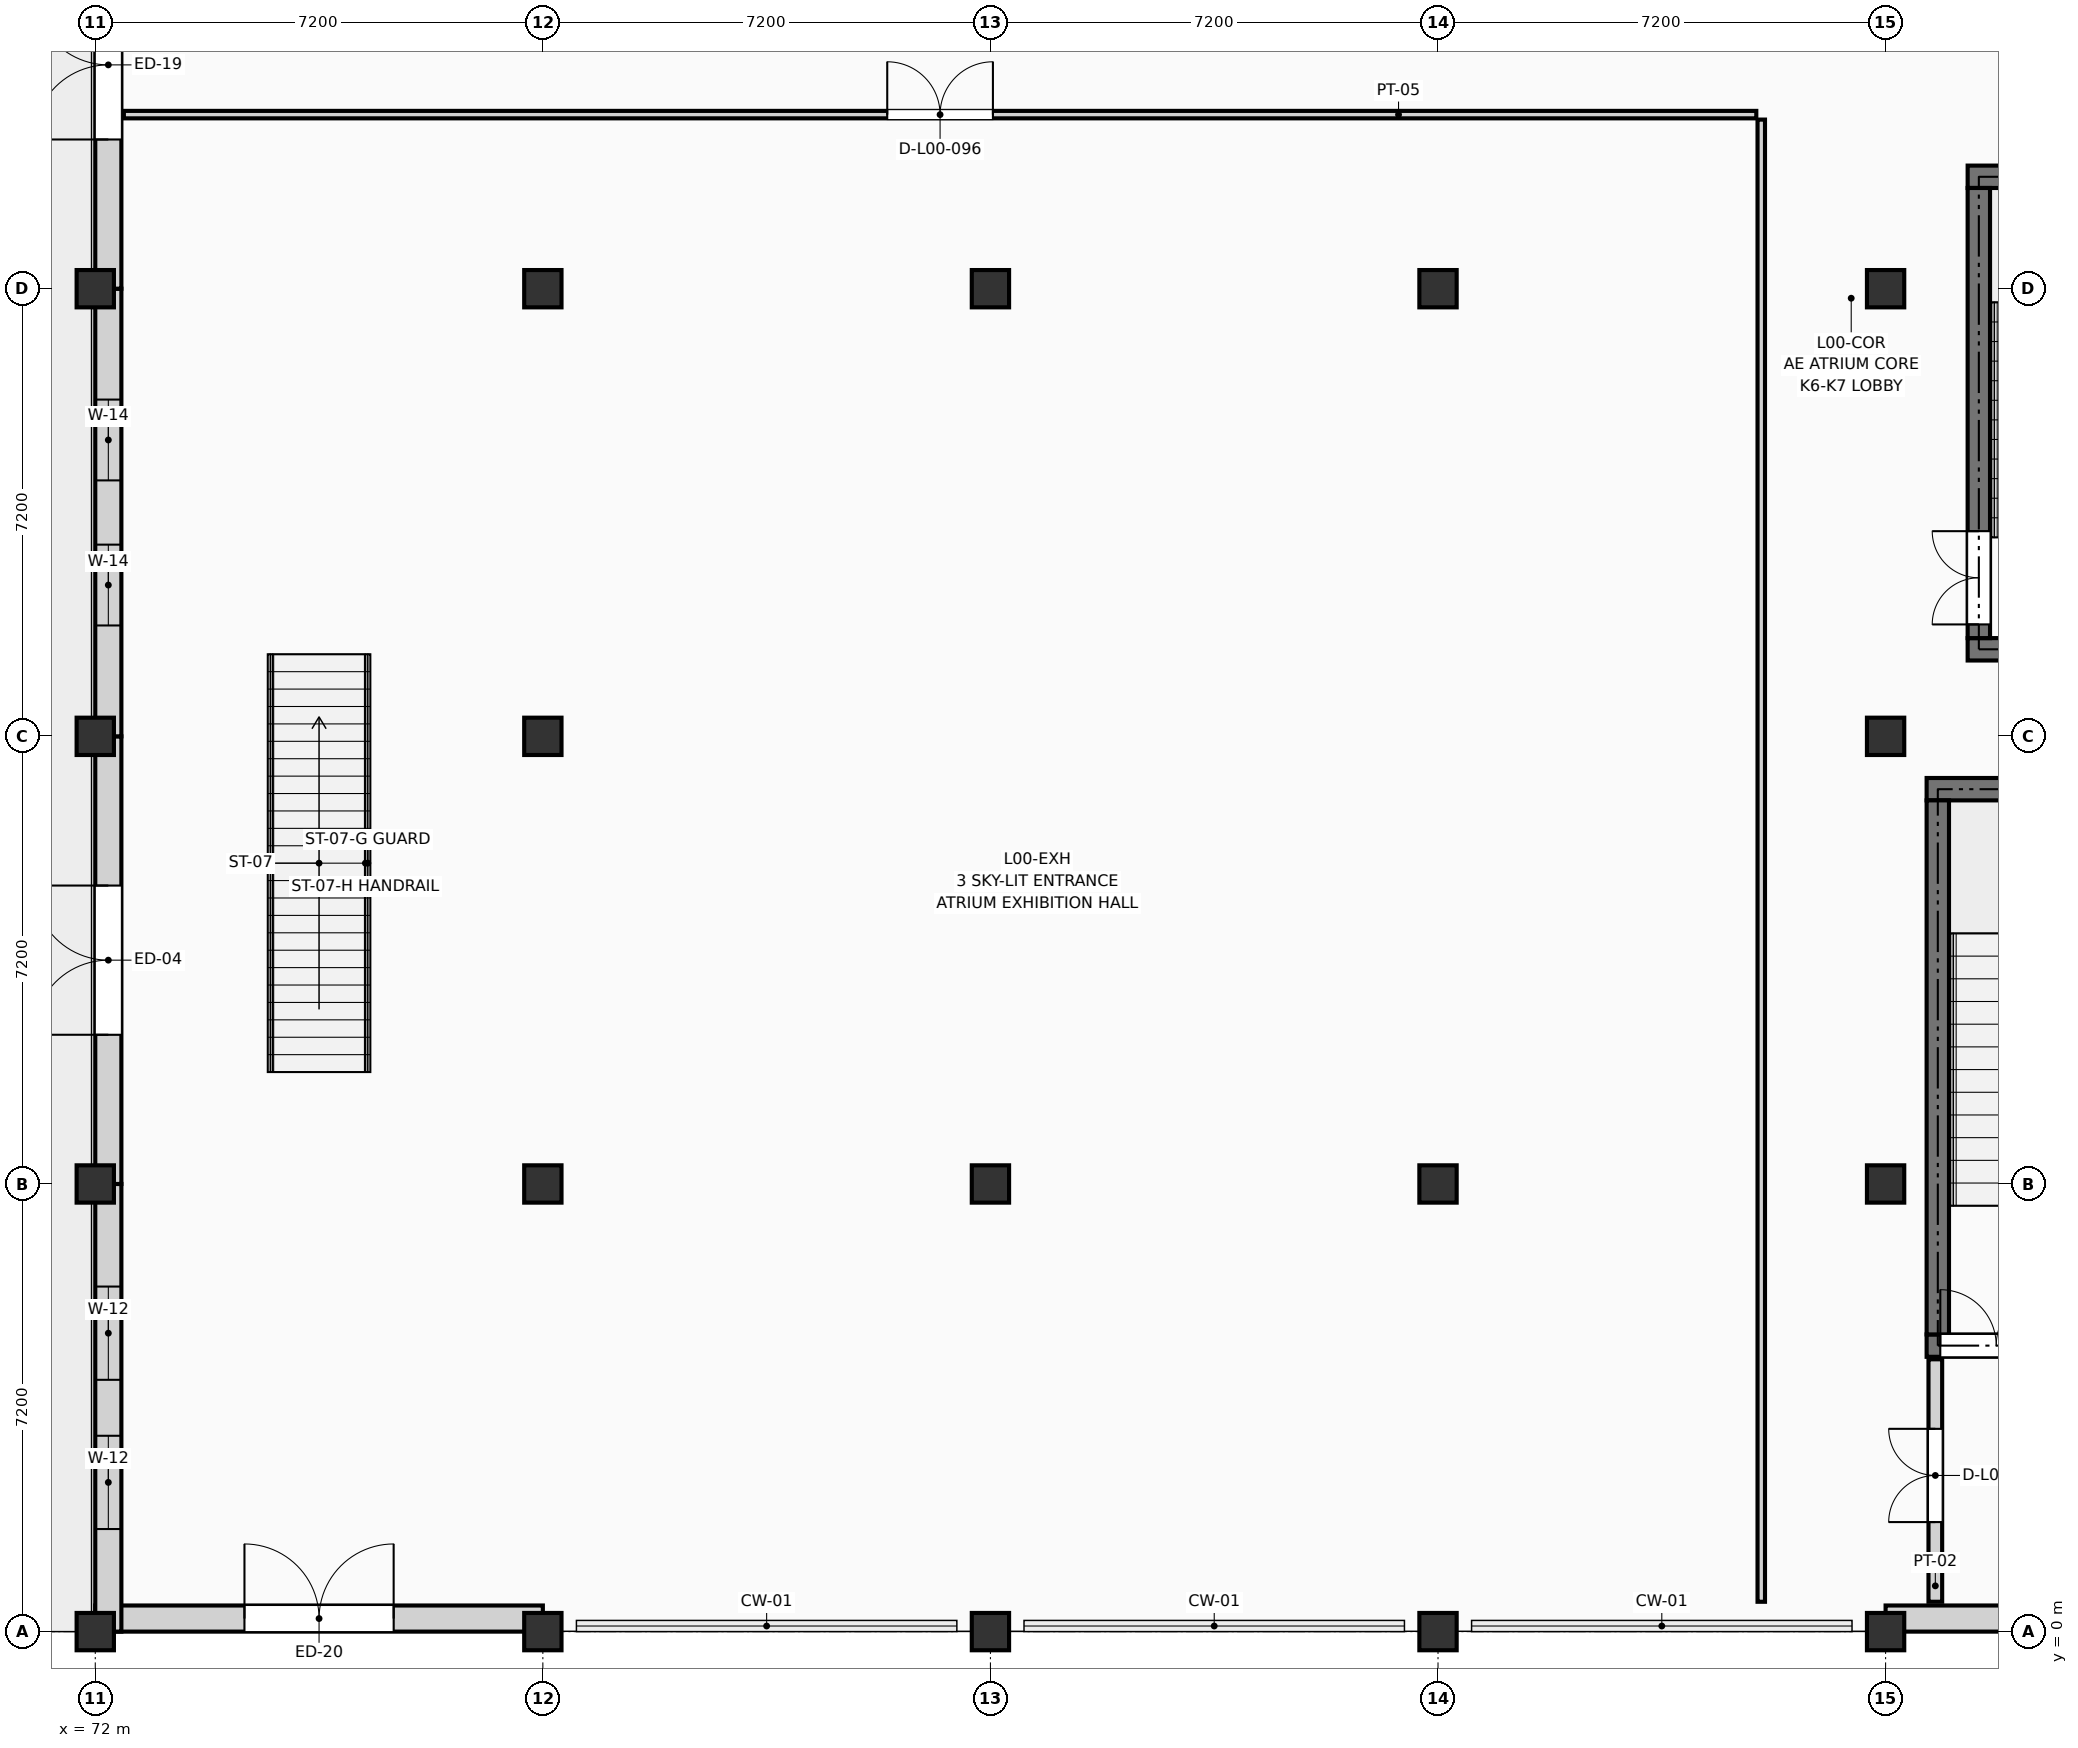
"""IFC4 building model, lengths in metres.
Left out: names, types, materials, properties, quantities, classifications, styles, units other than length and angle.
Written with IfcOpenShell. Run it as: python <this file> out.ifc"""

import sys

from ifc_helpers import new_model, si_unit, direction, frame, frame_2d, origin, origin_2d, place, context, subcontext, project, spatial, rectangle, extrude, element, fill, save


model = new_model("IFC4")
c1 = context("Model", 3, precision=1e-05, world=origin(), true_north=direction((0.0, 1.0)))
c2 = subcontext(c1, "Body", "Model", "MODEL_VIEW")
j1 = project(units=[si_unit("LENGTHUNIT", "METRE"), si_unit("PLANEANGLEUNIT", "RADIAN")], contexts=[c1])
p1 = place(None, origin())
s1 = spatial("IfcSite", under=j1, at=p1, CompositionType="ELEMENT")
p2 = place(p1, origin())
s2 = spatial("IfcBuilding", under=s1, at=p2, CompositionType="ELEMENT")
p3 = place(p2, origin())
s3 = spatial("IfcBuildingStorey", under=s2, at=p3, CompositionType="ELEMENT", Elevation=0.0)
for number, where, z_axis, x_axis in (
    (1, (72.0, 0.0, 0.0), (0.0, 0.0, 1.0), (1.0, 0.0, 0.0)),
    (2, (72.0, 7.2, 0.0), (0.0, 0.0, 1.0), (1.0, 0.0, 0.0)),
    (3, (72.0, 14.4, 0.0), (0.0, 0.0, 1.0), (1.0, 0.0, 0.0)),
    (4, (72.0, 21.6, 0.0), (0.0, 0.0, 1.0), (1.0, 0.0, 0.0)),
    (5, (79.2, 0.0, 0.0), (0.0, 0.0, 1.0), (1.0, 0.0, 0.0)),
    (6, (79.2, 7.2, 0.0), (0.0, 0.0, 1.0), (1.0, 0.0, 0.0)),
    (7, (79.2, 14.4, 0.0), (0.0, 0.0, 1.0), (1.0, 0.0, 0.0)),
    (8, (79.2, 21.6, 0.0), (0.0, 0.0, 1.0), (1.0, 0.0, 0.0)),
    (9, (86.4, 0.0, 0.0), (0.0, 0.0, 1.0), (1.0, 0.0, 0.0)),
    (10, (86.4, 7.2, 0.0), (0.0, 0.0, 1.0), (1.0, 0.0, 0.0)),
    (11, (86.4, 21.6, 0.0), (0.0, 0.0, 1.0), (1.0, 0.0, 0.0)),
    (12, (93.6, 0.0, 0.0), (0.0, 0.0, 1.0), (1.0, 0.0, 0.0)),
    (13, (93.6, 7.2, 0.0), (0.0, 0.0, 1.0), (1.0, 0.0, 0.0)),
    (14, (93.6, 21.6, 0.0), (0.0, 0.0, 1.0), (1.0, 0.0, 0.0)),
    (15, (100.8, 0.0, 0.0), (0.0, 0.0, 1.0), (1.0, 0.0, 0.0)),
    (16, (100.8, 7.2, 0.0), (0.0, 0.0, 1.0), (1.0, 0.0, 0.0)),
    (17, (100.8, 14.4, 0.0), (0.0, 0.0, 1.0), (1.0, 0.0, 0.0)),
    (18, (100.8, 21.6, 0.0), (0.0, 0.0, 1.0), (1.0, 0.0, 0.0)),
):
    element("IfcColumn", number, at=place(p3, frame(where, z_axis=z_axis, x_axis=x_axis)), inside=s3, PredefinedType="COLUMN", context=c2, shape_type="SweptSolid", body=[
        extrude(rectangle(XDim=0.6, YDim=0.6, at=origin_2d()), origin(), (0.0, 0.0, 1.0), 4.5),
    ])
p4 = place(p3, frame((100.8, 0.21, 0.0), z_axis=(0.0, 0.0, 1.0), x_axis=(1.0, 0.0, 0.0)))
e19 = element("IfcWall", 19, at=p4, inside=s3, PredefinedType="SOLIDWALL", context=c2, shape_type="SweptSolid", body=[
    extrude(rectangle(XDim=7.2, YDim=0.42, at=frame_2d((3.6, 0.0))), origin(), (0.0, 0.0, 1.0), 3.62),
])
p5 = place(p4, frame((2.4, 0.0, 0.0)))
e20 = element("IfcOpeningElement", 20, at=p5, cuts=e19, PredefinedType="OPENING", context=c2, shape_type="SweptSolid", body=[
    extrude(rectangle(XDim=2.4, YDim=2.6, at=frame_2d((1.2, 1.3))), frame((0.0, 0.222, 0.0), z_axis=(0.0, -1.0, 0.0), x_axis=(1.0, 0.0, 0.0)), (0.0, 0.0, 1.0), 0.444),
])
p6 = place(p3, frame((72.0, 0.21, 0.0), z_axis=(0.0, 0.0, 1.0), x_axis=(1.0, 0.0, 0.0)))
e21 = element("IfcWall", 21, at=p6, inside=s3, PredefinedType="SOLIDWALL", context=c2, shape_type="SweptSolid", body=[
    extrude(rectangle(XDim=7.2, YDim=0.42, at=frame_2d((3.6, 0.0))), origin(), (0.0, 0.0, 1.0), 3.62),
])
p7 = place(p6, frame((2.4, 0.0, 0.0)))
e22 = element("IfcOpeningElement", 22, at=p7, cuts=e21, PredefinedType="OPENING", context=c2, shape_type="SweptSolid", body=[
    extrude(rectangle(XDim=2.4, YDim=2.6, at=frame_2d((1.2, 1.3))), frame((0.0, 0.222, 0.0), z_axis=(0.0, -1.0, 0.0), x_axis=(1.0, 0.0, 0.0)), (0.0, 0.0, 1.0), 0.444),
])
p8 = place(p3, frame((72.21, 0.0, 0.0), z_axis=(0.0, 0.0, 1.0), x_axis=(0.0, 1.0, 0.0)))
e23 = element("IfcWall", 23, at=p8, inside=s3, PredefinedType="SOLIDWALL", context=c2, shape_type="SweptSolid", body=[
    extrude(rectangle(XDim=7.2, YDim=0.42, at=frame_2d((3.6, 0.0))), origin(), (0.0, 0.0, 1.0), 3.62),
])
p9 = place(p8, frame((1.65, 0.0, 0.45)))
e24 = element("IfcOpeningElement", 24, at=p9, cuts=e23, PredefinedType="OPENING", context=c2, shape_type="SweptSolid", body=[
    extrude(rectangle(XDim=1.5, YDim=2.6, at=frame_2d((0.75, 1.3))), frame((0.0, 0.222, 0.0), z_axis=(0.0, -1.0, 0.0), x_axis=(1.0, 0.0, 0.0)), (0.0, 0.0, 1.0), 0.444),
])
p10 = place(p8, frame((4.05, 0.0, 0.45)))
e25 = element("IfcOpeningElement", 25, at=p10, cuts=e23, PredefinedType="OPENING", context=c2, shape_type="SweptSolid", body=[
    extrude(rectangle(XDim=1.5, YDim=2.6, at=frame_2d((0.75, 1.3))), frame((0.0, 0.222, 0.0), z_axis=(0.0, -1.0, 0.0), x_axis=(1.0, 0.0, 0.0)), (0.0, 0.0, 1.0), 0.444),
])
p11 = place(p3, frame((72.21, 7.2, 0.0), z_axis=(0.0, 0.0, 1.0), x_axis=(0.0, 1.0, 0.0)))
e26 = element("IfcWall", 26, at=p11, inside=s3, PredefinedType="SOLIDWALL", context=c2, shape_type="SweptSolid", body=[
    extrude(rectangle(XDim=7.2, YDim=0.42, at=frame_2d((3.6, 0.0))), origin(), (0.0, 0.0, 1.0), 3.62),
])
p12 = place(p11, frame((2.4, 0.0, 0.0)))
e27 = element("IfcOpeningElement", 27, at=p12, cuts=e26, PredefinedType="OPENING", context=c2, shape_type="SweptSolid", body=[
    extrude(rectangle(XDim=2.4, YDim=2.6, at=frame_2d((1.2, 1.3))), frame((0.0, 0.222, 0.0), z_axis=(0.0, -1.0, 0.0), x_axis=(1.0, 0.0, 0.0)), (0.0, 0.0, 1.0), 0.444),
])
p13 = place(p3, frame((72.21, 14.4, 0.0), z_axis=(0.0, 0.0, 1.0), x_axis=(0.0, 1.0, 0.0)))
e28 = element("IfcWall", 28, at=p13, inside=s3, PredefinedType="SOLIDWALL", context=c2, shape_type="SweptSolid", body=[
    extrude(rectangle(XDim=7.2, YDim=0.42, at=frame_2d((3.6, 0.0))), origin(), (0.0, 0.0, 1.0), 3.62),
])
p14 = place(p13, frame((1.783, 0.0, 0.45)))
e29 = element("IfcOpeningElement", 29, at=p14, cuts=e28, PredefinedType="OPENING", context=c2, shape_type="SweptSolid", body=[
    extrude(rectangle(XDim=1.3, YDim=2.5, at=frame_2d((0.65, 1.25))), frame((0.0, 0.222, 0.0), z_axis=(0.0, -1.0, 0.0), x_axis=(1.0, 0.0, 0.0)), (0.0, 0.0, 1.0), 0.444),
])
p15 = place(p13, frame((4.117, 0.0, 0.45)))
e30 = element("IfcOpeningElement", 30, at=p15, cuts=e28, PredefinedType="OPENING", context=c2, shape_type="SweptSolid", body=[
    extrude(rectangle(XDim=1.3, YDim=2.5, at=frame_2d((0.65, 1.25))), frame((0.0, 0.222, 0.0), z_axis=(0.0, -1.0, 0.0), x_axis=(1.0, 0.0, 0.0)), (0.0, 0.0, 1.0), 0.444),
])
p16 = place(p3, frame((72.21, 21.6, 0.0), z_axis=(0.0, 0.0, 1.0), x_axis=(0.0, 1.0, 0.0)))
e31 = element("IfcWall", 31, at=p16, inside=s3, PredefinedType="SOLIDWALL", context=c2, shape_type="SweptSolid", body=[
    extrude(rectangle(XDim=7.2, YDim=0.42, at=frame_2d((3.6, 0.0))), origin(), (0.0, 0.0, 1.0), 3.62),
])
p17 = place(p16, frame((2.4, 0.0, 0.0)))
e32 = element("IfcOpeningElement", 32, at=p17, cuts=e31, PredefinedType="OPENING", context=c2, shape_type="SweptSolid", body=[
    extrude(rectangle(XDim=2.4, YDim=2.6, at=frame_2d((1.2, 1.3))), frame((0.0, 0.222, 0.0), z_axis=(0.0, -1.0, 0.0), x_axis=(1.0, 0.0, 0.0)), (0.0, 0.0, 1.0), 0.444),
])
for number, where, z_axis, x_axis in (
    (33, (102.12, 15.8, 0.0), (0.0, 0.0, 1.0), (1.0, 0.0, 0.0)),
    (34, (102.12, 23.4, 0.0), (0.0, 0.0, 1.0), (1.0, 0.0, 0.0)),
):
    element("IfcWall", number, at=place(p3, frame(where, z_axis=z_axis, x_axis=x_axis)), inside=s3, PredefinedType="SHEAR", context=c2, shape_type="SweptSolid", body=[
        extrude(rectangle(XDim=4.48, YDim=0.36, at=frame_2d((2.24, 0.0))), origin(), (0.0, 0.0, 1.0), 4.25),
    ])
p18 = place(p3, frame((102.3, 15.98, 0.0), z_axis=(0.0, 0.0, 1.0), x_axis=(0.0, 1.0, 0.0)))
e35 = element("IfcWall", 35, at=p18, inside=s3, PredefinedType="SHEAR", context=c2, shape_type="SweptSolid", body=[
    extrude(rectangle(XDim=7.24, YDim=0.36, at=frame_2d((3.62, 0.0))), origin(), (0.0, 0.0, 1.0), 4.25),
])
p19 = place(p18, frame((0.22, 0.0, 0.0)))
e36 = element("IfcOpeningElement", 36, at=p19, cuts=e35, PredefinedType="OPENING", context=c2, shape_type="SweptSolid", body=[
    extrude(rectangle(XDim=1.5, YDim=2.2, at=frame_2d((0.75, 1.1))), frame((0.0, 0.192, 0.0), z_axis=(0.0, -1.0, 0.0), x_axis=(1.0, 0.0, 0.0)), (0.0, 0.0, 1.0), 0.384),
])
p20 = place(p3, frame((101.46, 4.6, 0.0), z_axis=(0.0, 0.0, 1.0), x_axis=(1.0, 0.0, 0.0)))
e37 = element("IfcWall", 37, at=p20, inside=s3, PredefinedType="SHEAR", context=c2, shape_type="SweptSolid", body=[
    extrude(rectangle(XDim=5.88, YDim=0.36, at=frame_2d((2.94, 0.0))), origin(), (0.0, 0.0, 1.0), 4.25),
])
p21 = place(p20, frame((0.22, 0.0, 0.0)))
e38 = element("IfcOpeningElement", 38, at=p21, cuts=e37, PredefinedType="OPENING", context=c2, shape_type="SweptSolid", body=[
    extrude(rectangle(XDim=1.8, YDim=2.2, at=frame_2d((0.9, 1.1))), frame((0.0, 0.192, 0.0), z_axis=(0.0, -1.0, 0.0), x_axis=(1.0, 0.0, 0.0)), (0.0, 0.0, 1.0), 0.384),
])
p22 = place(p3, frame((101.46, 13.55, 0.0), z_axis=(0.0, 0.0, 1.0), x_axis=(1.0, 0.0, 0.0)))
e39 = element("IfcWall", 39, at=p22, inside=s3, PredefinedType="SHEAR", context=c2, shape_type="SweptSolid", body=[
    extrude(rectangle(XDim=5.88, YDim=0.36, at=frame_2d((2.94, 0.0))), origin(), (0.0, 0.0, 1.0), 4.25),
])
p23 = place(p3, frame((101.64, 4.78, 0.0), z_axis=(0.0, 0.0, 1.0), x_axis=(0.0, 1.0, 0.0)))
e40 = element("IfcWall", 40, at=p23, inside=s3, PredefinedType="SHEAR", context=c2, shape_type="SweptSolid", body=[
    extrude(rectangle(XDim=8.59, YDim=0.36, at=frame_2d((4.295, 0.0))), origin(), (0.0, 0.0, 1.0), 4.25),
])
p24 = place(p3, frame((98.8, 0.48, 0.0), z_axis=(0.0, 0.0, 1.0), x_axis=(0.0, 1.0, 0.0)))
e41 = element("IfcWall", 41, at=p24, inside=s3, PredefinedType="PARTITIONING", context=c2, shape_type="SweptSolid", body=[
    extrude(rectangle(XDim=23.84, YDim=0.12, at=frame_2d((11.92, 0.0))), origin(), (0.0, 0.0, 1.0), 4.235),
])
p25 = place(p3, frame((72.46, 24.4, 0.0), z_axis=(0.0, 0.0, 1.0), x_axis=(1.0, 0.0, 0.0)))
e42 = element("IfcWall", 42, at=p25, inside=s3, PredefinedType="PARTITIONING", context=c2, shape_type="SweptSolid", body=[
    extrude(rectangle(XDim=26.26, YDim=0.12, at=frame_2d((13.13, 0.0))), origin(), (0.0, 0.0, 1.0), 4.235),
])
p26 = place(p25, frame((12.28, 0.0, 0.0)))
e43 = element("IfcOpeningElement", 43, at=p26, cuts=e42, PredefinedType="OPENING", context=c2, shape_type="SweptSolid", body=[
    extrude(rectangle(XDim=1.7, YDim=2.28, at=frame_2d((0.85, 1.14))), frame((0.0, 0.072, 0.0), z_axis=(0.0, -1.0, 0.0), x_axis=(1.0, 0.0, 0.0)), (0.0, 0.0, 1.0), 0.144),
])
p27 = place(p3, frame((101.6, 0.48, 0.0), z_axis=(0.0, 0.0, 1.0), x_axis=(0.0, 1.0, 0.0)))
e44 = element("IfcWall", 44, at=p27, inside=s3, PredefinedType="PARTITIONING", context=c2, shape_type="SweptSolid", body=[
    extrude(rectangle(XDim=3.9, YDim=0.22, at=frame_2d((1.95, 0.0))), origin(), (0.0, 0.0, 1.0), 4.235),
])
p28 = place(p27, frame((1.282, 0.0, 0.0)))
e45 = element("IfcOpeningElement", 45, at=p28, cuts=e44, PredefinedType="OPENING", context=c2, shape_type="SweptSolid", body=[
    extrude(rectangle(XDim=1.5, YDim=2.25, at=frame_2d((0.75, 1.125))), frame((0.0, 0.122, 0.0), z_axis=(0.0, -1.0, 0.0), x_axis=(1.0, 0.0, 0.0)), (0.0, 0.0, 1.0), 0.244),
])
p29 = place(p7, origin())
e46 = element("IfcDoor", 46, at=p29, inside=s3, OperationType="DOUBLE_DOOR_SINGLE_SWING", PredefinedType="DOOR", context=c2, shape_type="SweptSolid", body=[
    extrude(rectangle(XDim=2.4, YDim=2.6, at=frame_2d((1.2, 1.3))), frame((0.0, 0.025, 0.0), z_axis=(0.0, -1.0, 0.0), x_axis=(1.0, 0.0, 0.0)), (0.0, 0.0, 1.0), 0.05),
])
fill(e22, e46)
p30 = place(p9, origin())
e47 = element("IfcWindow", 47, at=p30, inside=s3, PartitioningType="SINGLE_PANEL", PredefinedType="WINDOW", context=c2, shape_type="SweptSolid", body=[
    extrude(rectangle(XDim=1.5, YDim=2.6, at=frame_2d((0.75, 1.3))), frame((0.0, 0.03, 0.0), z_axis=(0.0, -1.0, 0.0), x_axis=(1.0, 0.0, 0.0)), (0.0, 0.0, 1.0), 0.06),
])
fill(e24, e47)
p31 = place(p10, origin())
e48 = element("IfcWindow", 48, at=p31, inside=s3, PartitioningType="SINGLE_PANEL", PredefinedType="WINDOW", context=c2, shape_type="SweptSolid", body=[
    extrude(rectangle(XDim=1.5, YDim=2.6, at=frame_2d((0.75, 1.3))), frame((0.0, 0.03, 0.0), z_axis=(0.0, -1.0, 0.0), x_axis=(1.0, 0.0, 0.0)), (0.0, 0.0, 1.0), 0.06),
])
fill(e25, e48)
p32 = place(p12, origin())
e49 = element("IfcDoor", 49, at=p32, inside=s3, OperationType="DOUBLE_DOOR_SINGLE_SWING", PredefinedType="DOOR", context=c2, shape_type="SweptSolid", body=[
    extrude(rectangle(XDim=2.4, YDim=2.6, at=frame_2d((1.2, 1.3))), frame((0.0, 0.025, 0.0), z_axis=(0.0, -1.0, 0.0), x_axis=(1.0, 0.0, 0.0)), (0.0, 0.0, 1.0), 0.05),
])
fill(e27, e49)
p33 = place(p14, origin())
e50 = element("IfcWindow", 50, at=p33, inside=s3, PartitioningType="SINGLE_PANEL", PredefinedType="WINDOW", context=c2, shape_type="SweptSolid", body=[
    extrude(rectangle(XDim=1.3, YDim=2.5, at=frame_2d((0.65, 1.25))), frame((0.0, 0.03, 0.0), z_axis=(0.0, -1.0, 0.0), x_axis=(1.0, 0.0, 0.0)), (0.0, 0.0, 1.0), 0.06),
])
fill(e29, e50)
p34 = place(p15, origin())
e51 = element("IfcWindow", 51, at=p34, inside=s3, PartitioningType="SINGLE_PANEL", PredefinedType="WINDOW", context=c2, shape_type="SweptSolid", body=[
    extrude(rectangle(XDim=1.3, YDim=2.5, at=frame_2d((0.65, 1.25))), frame((0.0, 0.03, 0.0), z_axis=(0.0, -1.0, 0.0), x_axis=(1.0, 0.0, 0.0)), (0.0, 0.0, 1.0), 0.06),
])
fill(e30, e51)
p35 = place(p17, origin())
e52 = element("IfcDoor", 52, at=p35, inside=s3, OperationType="DOUBLE_DOOR_SINGLE_SWING", PredefinedType="DOOR", context=c2, shape_type="SweptSolid", body=[
    extrude(rectangle(XDim=2.4, YDim=2.6, at=frame_2d((1.2, 1.3))), frame((0.0, 0.025, 0.0), z_axis=(0.0, -1.0, 0.0), x_axis=(1.0, 0.0, 0.0)), (0.0, 0.0, 1.0), 0.05),
])
fill(e32, e52)
p36 = place(p19, origin())
e53 = element("IfcDoor", 53, at=p36, inside=s3, OperationType="DOUBLE_DOOR_SINGLE_SWING", PredefinedType="DOOR", context=c2, shape_type="SweptSolid", body=[
    extrude(rectangle(XDim=1.5, YDim=2.2, at=frame_2d((0.75, 1.1))), frame((0.0, 0.025, 0.0), z_axis=(0.0, -1.0, 0.0), x_axis=(1.0, 0.0, 0.0)), (0.0, 0.0, 1.0), 0.05),
])
fill(e36, e53)
p37 = place(p21, origin())
e54 = element("IfcDoor", 54, at=p37, inside=s3, OperationType="DOUBLE_DOOR_SINGLE_SWING", PredefinedType="DOOR", context=c2, shape_type="SweptSolid", body=[
    extrude(rectangle(XDim=1.8, YDim=2.2, at=frame_2d((0.9, 1.1))), frame((0.0, 0.025, 0.0), z_axis=(0.0, -1.0, 0.0), x_axis=(1.0, 0.0, 0.0)), (0.0, 0.0, 1.0), 0.05),
])
fill(e38, e54)
p38 = place(p26, origin())
e55 = element("IfcDoor", 55, at=p38, inside=s3, OperationType="DOUBLE_DOOR_SINGLE_SWING", PredefinedType="DOOR", context=c2, shape_type="SweptSolid", body=[
    extrude(rectangle(XDim=1.7, YDim=2.28, at=frame_2d((0.85, 1.14))), frame((0.0, 0.025, 0.0), z_axis=(0.0, -1.0, 0.0), x_axis=(1.0, 0.0, 0.0)), (0.0, 0.0, 1.0), 0.05),
])
fill(e43, e55)
p39 = place(p28, origin())
e56 = element("IfcDoor", 56, at=p39, inside=s3, OperationType="DOUBLE_DOOR_SINGLE_SWING", PredefinedType="DOOR", context=c2, shape_type="SweptSolid", body=[
    extrude(rectangle(XDim=1.5, YDim=2.25, at=frame_2d((0.75, 1.125))), frame((0.0, 0.025, 0.0), z_axis=(0.0, -1.0, 0.0), x_axis=(1.0, 0.0, 0.0)), (0.0, 0.0, 1.0), 0.05),
])
fill(e45, e56)
save(model, sys.argv[1])
